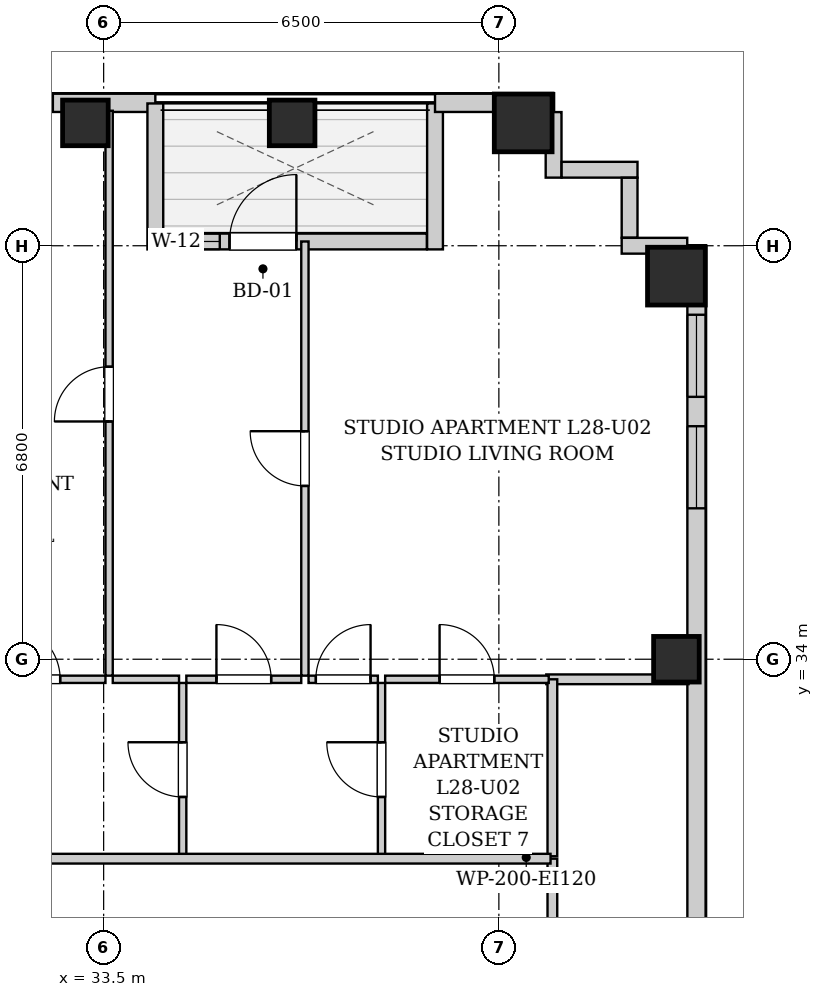
"""IFC4 building model, lengths in metres.
Left out: names, types, materials, properties, quantities, classifications, styles, units other than length and angle.
Written with IfcOpenShell. Run it as: python <this file> out.ifc"""

import sys

from ifc_helpers import new_model, si_unit, direction, frame, frame_2d, origin, origin_2d, place, context, subcontext, project, spatial, rectangle, extrude, element, fill, save


model = new_model("IFC4")
c1 = context("Model", 3, precision=1e-05, world=origin(), true_north=direction((0.0, 1.0)))
c2 = subcontext(c1, "Body", "Model", "MODEL_VIEW")
j1 = project(units=[si_unit("LENGTHUNIT", "METRE"), si_unit("PLANEANGLEUNIT", "RADIAN")], contexts=[c1])
p1 = place(None, origin())
s1 = spatial("IfcSite", under=j1, at=p1, CompositionType="ELEMENT")
p2 = place(p1, origin())
s2 = spatial("IfcBuilding", under=s1, at=p2, CompositionType="ELEMENT")
p3 = place(p2, frame((0.0, 0.0, 100.7)))
s3 = spatial("IfcBuildingStorey", under=s2, at=p3, CompositionType="ELEMENT", Elevation=100.7)
for number, where, z_axis, x_axis in (
    (1, (33.2, 42.82, 0.0), (0.0, 0.0, 1.0), (1.0, 0.0, 0.0)),
    (2, (36.6, 42.82, 0.0), (0.0, 0.0, 1.0), (1.0, 0.0, 0.0)),
):
    element("IfcColumn", number, at=place(p3, frame(where, z_axis=z_axis, x_axis=x_axis)), inside=s3, PredefinedType="COLUMN", context=c2, shape_type="SweptSolid", body=[
        extrude(rectangle(XDim=0.75, YDim=0.75, at=origin_2d()), origin(), (0.0, 0.0, 1.0), 3.2),
    ])
p4 = place(p3, frame((40.4, 42.82, 0.0), z_axis=(0.0, 0.0, 1.0), x_axis=(1.0, 0.0, 0.0)))
e3 = element("IfcColumn", 3, at=p4, inside=s3, PredefinedType="COLUMN", context=c2, shape_type="SweptSolid", body=[
    extrude(rectangle(XDim=0.95, YDim=0.95, at=origin_2d()), origin(), (0.0, 0.0, 1.0), 3.2),
])
p5 = place(p3, frame((42.92, 34.0, 0.0), z_axis=(0.0, 0.0, 1.0), x_axis=(1.0, 0.0, 0.0)))
e4 = element("IfcColumn", 4, at=p5, inside=s3, PredefinedType="COLUMN", context=c2, shape_type="SweptSolid", body=[
    extrude(rectangle(XDim=0.75, YDim=0.75, at=origin_2d()), origin(), (0.0, 0.0, 1.0), 3.2),
])
p6 = place(p3, frame((42.92, 40.3, 0.0), z_axis=(0.0, 0.0, 1.0), x_axis=(1.0, 0.0, 0.0)))
e5 = element("IfcColumn", 5, at=p6, inside=s3, PredefinedType="COLUMN", context=c2, shape_type="SweptSolid", body=[
    extrude(rectangle(XDim=0.95, YDim=0.95, at=origin_2d()), origin(), (0.0, 0.0, 1.0), 3.2),
])
p7 = place(p3, frame((10.0, 43.15, 0.0), z_axis=(0.0, 0.0, 1.0), x_axis=(1.0, 0.0, 0.0)))
e6 = element("IfcWall", 6, at=p7, inside=s3, PredefinedType="SOLIDWALL", context=c2, shape_type="SweptSolid", body=[
    extrude(rectangle(XDim=24.35, YDim=0.3, at=frame_2d((12.175, 0.0))), origin(), (0.0, 0.0, 1.0), 2.94),
])
p8 = place(p7, frame((1.956, 0.0, 0.55)))
e7 = element("IfcOpeningElement", 7, at=p8, cuts=e6, PredefinedType="OPENING", context=c2, shape_type="SweptSolid", body=[
    extrude(rectangle(XDim=1.35, YDim=1.2, at=frame_2d((0.675, 0.6))), frame((0.0, 0.16, 0.0), z_axis=(0.0, -1.0, 0.0), x_axis=(1.0, 0.0, 0.0)), (0.0, 0.0, 1.0), 0.32),
])
p9 = place(p7, frame((5.187, 0.0, 0.55)))
e8 = element("IfcOpeningElement", 8, at=p9, cuts=e6, PredefinedType="OPENING", context=c2, shape_type="SweptSolid", body=[
    extrude(rectangle(XDim=1.35, YDim=1.2, at=frame_2d((0.675, 0.6))), frame((0.0, 0.16, 0.0), z_axis=(0.0, -1.0, 0.0), x_axis=(1.0, 0.0, 0.0)), (0.0, 0.0, 1.0), 0.32),
])
p10 = place(p7, frame((8.418, 0.0, 0.55)))
e9 = element("IfcOpeningElement", 9, at=p10, cuts=e6, PredefinedType="OPENING", context=c2, shape_type="SweptSolid", body=[
    extrude(rectangle(XDim=1.35, YDim=1.2, at=frame_2d((0.675, 0.6))), frame((0.0, 0.16, 0.0), z_axis=(0.0, -1.0, 0.0), x_axis=(1.0, 0.0, 0.0)), (0.0, 0.0, 1.0), 0.32),
])
p11 = place(p7, frame((11.15, 0.0, 0.55)))
e10 = element("IfcOpeningElement", 10, at=p11, cuts=e6, PredefinedType="OPENING", context=c2, shape_type="SweptSolid", body=[
    extrude(rectangle(XDim=1.35, YDim=1.2, at=frame_2d((0.675, 0.6))), frame((0.0, 0.16, 0.0), z_axis=(0.0, -1.0, 0.0), x_axis=(1.0, 0.0, 0.0)), (0.0, 0.0, 1.0), 0.32),
])
p12 = place(p7, frame((18.038, 0.0, 0.55)))
e11 = element("IfcOpeningElement", 11, at=p12, cuts=e6, PredefinedType="OPENING", context=c2, shape_type="SweptSolid", body=[
    extrude(rectangle(XDim=1.35, YDim=1.2, at=frame_2d((0.675, 0.6))), frame((0.0, 0.16, 0.0), z_axis=(0.0, -1.0, 0.0), x_axis=(1.0, 0.0, 0.0)), (0.0, 0.0, 1.0), 0.32),
])
p13 = place(p7, frame((21.315, 0.0, 0.55)))
e12 = element("IfcOpeningElement", 12, at=p13, cuts=e6, PredefinedType="OPENING", context=c2, shape_type="SweptSolid", body=[
    extrude(rectangle(XDim=1.35, YDim=1.2, at=frame_2d((0.675, 0.6))), frame((0.0, 0.16, 0.0), z_axis=(0.0, -1.0, 0.0), x_axis=(1.0, 0.0, 0.0)), (0.0, 0.0, 1.0), 0.32),
])
p14 = place(p3, frame((34.35, 43.14, 0.0), z_axis=(0.0, 0.0, 1.0), x_axis=(0.0, -1.0, 0.0)))
e13 = element("IfcWall", 13, at=p14, inside=s3, PredefinedType="SOLIDWALL", context=c2, shape_type="SweptSolid", body=[
    extrude(rectangle(XDim=2.4, YDim=0.26, at=frame_2d((1.2, 0.0))), origin(), (0.0, 0.0, 1.0), 2.94),
])
p15 = place(p3, frame((34.484, 40.87, 0.0), z_axis=(0.0, 0.0, 1.0), x_axis=(1.0, 0.0, 0.0)))
e14 = element("IfcWall", 14, at=p15, inside=s3, PredefinedType="SOLIDWALL", context=c2, shape_type="SweptSolid", body=[
    extrude(rectangle(XDim=4.332, YDim=0.26, at=frame_2d((2.166, 0.0))), origin(), (0.0, 0.0, 1.0), 2.94),
])
p16 = place(p15, frame((1.086, 0.0, 0.0)))
e15 = element("IfcOpeningElement", 15, at=p16, cuts=e14, PredefinedType="OPENING", context=c2, shape_type="SweptSolid", body=[
    extrude(rectangle(XDim=1.1, YDim=2.0, at=frame_2d((0.55, 1.0))), frame((0.0, 0.14, 0.0), z_axis=(0.0, -1.0, 0.0), x_axis=(1.0, 0.0, 0.0)), (0.0, 0.0, 1.0), 0.28),
])
p17 = place(p15, frame((0.246, 0.0, 0.55)))
e16 = element("IfcOpeningElement", 16, at=p17, cuts=e14, PredefinedType="OPENING", context=c2, shape_type="SweptSolid", body=[
    extrude(rectangle(XDim=0.68, YDim=1.2, at=frame_2d((0.34, 0.6))), frame((0.0, 0.14, 0.0), z_axis=(0.0, -1.0, 0.0), x_axis=(1.0, 0.0, 0.0)), (0.0, 0.0, 1.0), 0.28),
])
p18 = place(p3, frame((38.95, 40.74, 0.0), z_axis=(0.0, 0.0, 1.0), x_axis=(0.0, 1.0, 0.0)))
e17 = element("IfcWall", 17, at=p18, inside=s3, PredefinedType="SOLIDWALL", context=c2, shape_type="SweptSolid", body=[
    extrude(rectangle(XDim=2.4, YDim=0.26, at=frame_2d((1.2, 0.0))), origin(), (0.0, 0.0, 1.0), 2.94),
])
p19 = place(p3, frame((38.95, 43.15, 0.0), z_axis=(0.0, 0.0, 1.0), x_axis=(1.0, 0.0, 0.0)))
e18 = element("IfcWall", 18, at=p19, inside=s3, PredefinedType="SOLIDWALL", context=c2, shape_type="SweptSolid", body=[
    extrude(rectangle(XDim=1.95, YDim=0.3, at=frame_2d((0.975, 0.0))), origin(), (0.0, 0.0, 1.0), 2.94),
])
p20 = place(p3, frame((43.25, 40.8, 0.0), z_axis=(0.0, 0.0, 1.0), x_axis=(0.0, -1.0, 0.0)))
e19 = element("IfcWall", 19, at=p20, inside=s3, PredefinedType="SOLIDWALL", context=c2, shape_type="SweptSolid", body=[
    extrude(rectangle(XDim=12.6, YDim=0.3, at=frame_2d((6.3, 0.0))), origin(), (0.0, 0.0, 1.0), 2.94),
])
p21 = place(p20, frame((2.968, 0.0, 0.55)))
e20 = element("IfcOpeningElement", 20, at=p21, cuts=e19, PredefinedType="OPENING", context=c2, shape_type="SweptSolid", body=[
    extrude(rectangle(XDim=1.35, YDim=1.2, at=frame_2d((0.675, 0.6))), frame((0.0, 0.16, 0.0), z_axis=(0.0, -1.0, 0.0), x_axis=(1.0, 0.0, 0.0)), (0.0, 0.0, 1.0), 0.32),
])
p22 = place(p20, frame((1.135, 0.0, 0.55)))
e21 = element("IfcOpeningElement", 21, at=p22, cuts=e19, PredefinedType="OPENING", context=c2, shape_type="SweptSolid", body=[
    extrude(rectangle(XDim=1.35, YDim=1.2, at=frame_2d((0.675, 0.6))), frame((0.0, 0.16, 0.0), z_axis=(0.0, -1.0, 0.0), x_axis=(1.0, 0.0, 0.0)), (0.0, 0.0, 1.0), 0.32),
])
p23 = place(p3, frame((40.9, 42.998, 0.0), z_axis=(0.0, 0.0, 1.0), x_axis=(0.0, -1.0, 0.0)))
e22 = element("IfcWall", 22, at=p23, inside=s3, PredefinedType="SOLIDWALL", context=c2, shape_type="SweptSolid", body=[
    extrude(rectangle(XDim=1.078, YDim=0.26, at=frame_2d((0.539, 0.0))), origin(), (0.0, 0.0, 1.0), 2.94),
])
p24 = place(p3, frame((41.032, 42.05, 0.0), z_axis=(0.0, 0.0, 1.0), x_axis=(1.0, 0.0, 0.0)))
e23 = element("IfcWall", 23, at=p24, inside=s3, PredefinedType="SOLIDWALL", context=c2, shape_type="SweptSolid", body=[
    extrude(rectangle(XDim=1.248, YDim=0.26, at=frame_2d((0.624, 0.0))), origin(), (0.0, 0.0, 1.0), 2.94),
])
p25 = place(p3, frame((42.15, 41.918, 0.0), z_axis=(0.0, 0.0, 1.0), x_axis=(0.0, -1.0, 0.0)))
e24 = element("IfcWall", 24, at=p25, inside=s3, PredefinedType="SOLIDWALL", context=c2, shape_type="SweptSolid", body=[
    extrude(rectangle(XDim=0.986, YDim=0.26, at=frame_2d((0.493, 0.0))), origin(), (0.0, 0.0, 1.0), 2.94),
])
p26 = place(p3, frame((42.02, 40.8, 0.0), z_axis=(0.0, 0.0, 1.0), x_axis=(1.0, 0.0, 0.0)))
e25 = element("IfcWall", 25, at=p26, inside=s3, PredefinedType="SOLIDWALL", context=c2, shape_type="SweptSolid", body=[
    extrude(rectangle(XDim=1.078, YDim=0.26, at=frame_2d((0.539, 0.0))), origin(), (0.0, 0.0, 1.0), 2.94),
])
p27 = place(p3, frame((40.88, 28.98, 0.0), z_axis=(0.0, 0.0, 1.0), x_axis=(0.0, 1.0, 0.0)))
e26 = element("IfcWall", 26, at=p27, inside=s3, PredefinedType="PARTITIONING", context=c2, shape_type="SweptSolid", body=[
    extrude(rectangle(XDim=1.74, YDim=0.16, at=frame_2d((0.87, 0.0))), origin(), (0.0, 0.0, 1.0), 2.94),
])
p28 = place(p3, frame((40.78, 33.67, 0.0), z_axis=(0.0, 0.0, 1.0), x_axis=(1.0, 0.0, 0.0)))
e27 = element("IfcWall", 27, at=p28, inside=s3, PredefinedType="PARTITIONING", context=c2, shape_type="SweptSolid", body=[
    extrude(rectangle(XDim=2.34, YDim=0.16, at=frame_2d((1.17, 0.0))), origin(), (0.0, 0.0, 1.0), 2.94),
])
p29 = place(p3, frame((40.88, 30.76, 0.0), z_axis=(0.0, 0.0, 1.0), x_axis=(0.0, 1.0, 0.0)))
e28 = element("IfcWall", 28, at=p29, inside=s3, PredefinedType="PARTITIONING", context=c2, shape_type="SweptSolid", body=[
    extrude(rectangle(XDim=2.91, YDim=0.16, at=frame_2d((1.455, 0.0))), origin(), (0.0, 0.0, 1.0), 2.94),
])
p30 = place(p3, frame((34.8, 30.76, 0.0), z_axis=(0.0, 0.0, 1.0), x_axis=(0.0, 1.0, 0.0)))
e29 = element("IfcWall", 29, at=p30, inside=s3, PredefinedType="PARTITIONING", context=c2, shape_type="SweptSolid", body=[
    extrude(rectangle(XDim=2.85, YDim=0.12, at=frame_2d((1.425, 0.0))), origin(), (0.0, 0.0, 1.0), 2.94),
])
p31 = place(p30, frame((0.975, 0.0, 0.0)))
e30 = element("IfcOpeningElement", 30, at=p31, cuts=e29, PredefinedType="OPENING", context=c2, shape_type="SweptSolid", body=[
    extrude(rectangle(XDim=0.9, YDim=2.05, at=frame_2d((0.45, 1.025))), frame((0.0, 0.07, 0.0), z_axis=(0.0, -1.0, 0.0), x_axis=(1.0, 0.0, 0.0)), (0.0, 0.0, 1.0), 0.14),
])
p32 = place(p3, frame((31.14, 33.67, 0.0), z_axis=(0.0, 0.0, 1.0), x_axis=(1.0, 0.0, 0.0)))
e31 = element("IfcWall", 31, at=p32, inside=s3, PredefinedType="PARTITIONING", context=c2, shape_type="SweptSolid", body=[
    extrude(rectangle(XDim=2.39, YDim=0.12, at=frame_2d((1.195, 0.0))), origin(), (0.0, 0.0, 1.0), 2.94),
])
p33 = place(p32, frame((0.745, 0.0, 0.0)))
e32 = element("IfcOpeningElement", 32, at=p33, cuts=e31, PredefinedType="OPENING", context=c2, shape_type="SweptSolid", body=[
    extrude(rectangle(XDim=0.9, YDim=2.05, at=frame_2d((0.45, 1.025))), frame((0.0, 0.07, 0.0), z_axis=(0.0, -1.0, 0.0), x_axis=(1.0, 0.0, 0.0)), (0.0, 0.0, 1.0), 0.14),
])
p34 = place(p3, frame((33.65, 33.67, 0.0), z_axis=(0.0, 0.0, 1.0), x_axis=(1.0, 0.0, 0.0)))
e33 = element("IfcWall", 33, at=p34, inside=s3, PredefinedType="PARTITIONING", context=c2, shape_type="SweptSolid", body=[
    extrude(rectangle(XDim=1.09, YDim=0.12, at=frame_2d((0.545, 0.0))), origin(), (0.0, 0.0, 1.0), 2.94),
])
p35 = place(p3, frame((38.07, 30.76, 0.0), z_axis=(0.0, 0.0, 1.0), x_axis=(0.0, 1.0, 0.0)))
e34 = element("IfcWall", 34, at=p35, inside=s3, PredefinedType="PARTITIONING", context=c2, shape_type="SweptSolid", body=[
    extrude(rectangle(XDim=2.85, YDim=0.12, at=frame_2d((1.425, 0.0))), origin(), (0.0, 0.0, 1.0), 2.94),
])
p36 = place(p35, frame((0.975, 0.0, 0.0)))
e35 = element("IfcOpeningElement", 35, at=p36, cuts=e34, PredefinedType="OPENING", context=c2, shape_type="SweptSolid", body=[
    extrude(rectangle(XDim=0.9, YDim=2.05, at=frame_2d((0.45, 1.025))), frame((0.0, 0.07, 0.0), z_axis=(0.0, -1.0, 0.0), x_axis=(1.0, 0.0, 0.0)), (0.0, 0.0, 1.0), 0.14),
])
p37 = place(p3, frame((34.86, 33.67, 0.0), z_axis=(0.0, 0.0, 1.0), x_axis=(1.0, 0.0, 0.0)))
e36 = element("IfcWall", 36, at=p37, inside=s3, PredefinedType="PARTITIONING", context=c2, shape_type="SweptSolid", body=[
    extrude(rectangle(XDim=1.89, YDim=0.12, at=frame_2d((0.945, 0.0))), origin(), (0.0, 0.0, 1.0), 2.94),
])
p38 = place(p37, frame((0.495, 0.0, 0.0)))
e37 = element("IfcOpeningElement", 37, at=p38, cuts=e36, PredefinedType="OPENING", context=c2, shape_type="SweptSolid", body=[
    extrude(rectangle(XDim=0.9, YDim=2.05, at=frame_2d((0.45, 1.025))), frame((0.0, 0.07, 0.0), z_axis=(0.0, -1.0, 0.0), x_axis=(1.0, 0.0, 0.0)), (0.0, 0.0, 1.0), 0.14),
])
p39 = place(p3, frame((36.87, 33.67, 0.0), z_axis=(0.0, 0.0, 1.0), x_axis=(1.0, 0.0, 0.0)))
e38 = element("IfcWall", 38, at=p39, inside=s3, PredefinedType="PARTITIONING", context=c2, shape_type="SweptSolid", body=[
    extrude(rectangle(XDim=1.14, YDim=0.12, at=frame_2d((0.57, 0.0))), origin(), (0.0, 0.0, 1.0), 2.94),
])
p40 = place(p39, frame((0.12, 0.0, 0.0)))
e39 = element("IfcOpeningElement", 39, at=p40, cuts=e38, PredefinedType="OPENING", context=c2, shape_type="SweptSolid", body=[
    extrude(rectangle(XDim=0.9, YDim=2.05, at=frame_2d((0.45, 1.025))), frame((0.0, 0.07, 0.0), z_axis=(0.0, -1.0, 0.0), x_axis=(1.0, 0.0, 0.0)), (0.0, 0.0, 1.0), 0.14),
])
p41 = place(p3, frame((38.13, 33.67, 0.0), z_axis=(0.0, 0.0, 1.0), x_axis=(1.0, 0.0, 0.0)))
e40 = element("IfcWall", 40, at=p41, inside=s3, PredefinedType="PARTITIONING", context=c2, shape_type="SweptSolid", body=[
    extrude(rectangle(XDim=2.69, YDim=0.12, at=frame_2d((1.345, 0.0))), origin(), (0.0, 0.0, 1.0), 2.94),
])
p42 = place(p41, frame((0.895, 0.0, 0.0)))
e41 = element("IfcOpeningElement", 41, at=p42, cuts=e40, PredefinedType="OPENING", context=c2, shape_type="SweptSolid", body=[
    extrude(rectangle(XDim=0.9, YDim=2.05, at=frame_2d((0.45, 1.025))), frame((0.0, 0.07, 0.0), z_axis=(0.0, -1.0, 0.0), x_axis=(1.0, 0.0, 0.0)), (0.0, 0.0, 1.0), 0.14),
])
p43 = place(p3, frame((33.59, 33.73, 0.0), z_axis=(0.0, 0.0, 1.0), x_axis=(0.0, 1.0, 0.0)))
e42 = element("IfcWall", 42, at=p43, inside=s3, PredefinedType="PARTITIONING", context=c2, shape_type="SweptSolid", body=[
    extrude(rectangle(XDim=9.29, YDim=0.12, at=frame_2d((4.645, 0.0))), origin(), (0.0, 0.0, 1.0), 2.94),
])
p44 = place(p43, frame((4.18, 0.0, 0.0)))
e43 = element("IfcOpeningElement", 43, at=p44, cuts=e42, PredefinedType="OPENING", context=c2, shape_type="SweptSolid", body=[
    extrude(rectangle(XDim=0.9, YDim=2.05, at=frame_2d((0.45, 1.025))), frame((0.0, 0.07, 0.0), z_axis=(0.0, -1.0, 0.0), x_axis=(1.0, 0.0, 0.0)), (0.0, 0.0, 1.0), 0.14),
])
p45 = place(p3, frame((36.81, 33.73, 0.0), z_axis=(0.0, 0.0, 1.0), x_axis=(0.0, 1.0, 0.0)))
e44 = element("IfcWall", 44, at=p45, inside=s3, PredefinedType="PARTITIONING", context=c2, shape_type="SweptSolid", body=[
    extrude(rectangle(XDim=7.14, YDim=0.12, at=frame_2d((3.57, 0.0))), origin(), (0.0, 0.0, 1.0), 2.94),
])
p46 = place(p45, frame((3.12, 0.0, 0.0)))
e45 = element("IfcOpeningElement", 45, at=p46, cuts=e44, PredefinedType="OPENING", context=c2, shape_type="SweptSolid", body=[
    extrude(rectangle(XDim=0.9, YDim=2.05, at=frame_2d((0.45, 1.025))), frame((0.0, 0.07, 0.0), z_axis=(0.0, -1.0, 0.0), x_axis=(1.0, 0.0, 0.0)), (0.0, 0.0, 1.0), 0.14),
])
p47 = place(p3, frame((10.05, 30.72, 0.0), z_axis=(0.0, 0.0, 1.0), x_axis=(1.0, 0.0, 0.0)))
e46 = element("IfcWall", 46, at=p47, inside=s3, PredefinedType="PARTITIONING", context=c2, shape_type="SweptSolid", body=[
    extrude(rectangle(XDim=30.8, YDim=0.16, at=frame_2d((15.4, 0.0))), origin(), (0.0, 0.0, 1.0), 2.94),
])
p48 = place(p47, frame((4.295, 0.0, 0.0)))
e47 = element("IfcOpeningElement", 47, at=p48, cuts=e46, PredefinedType="OPENING", context=c2, shape_type="SweptSolid", body=[
    extrude(rectangle(XDim=0.95, YDim=2.1, at=frame_2d((0.475, 1.05))), frame((0.0, 0.09, 0.0), z_axis=(0.0, -1.0, 0.0), x_axis=(1.0, 0.0, 0.0)), (0.0, 0.0, 1.0), 0.18),
])
p49 = place(p31, origin())
e48 = element("IfcDoor", 48, at=p49, inside=s3, OperationType="SINGLE_SWING_RIGHT", PredefinedType="DOOR", context=c2, shape_type="SweptSolid", body=[
    extrude(rectangle(XDim=0.9, YDim=2.05, at=frame_2d((0.45, 1.025))), frame((0.0, 0.025, 0.0), z_axis=(0.0, -1.0, 0.0), x_axis=(1.0, 0.0, 0.0)), (0.0, 0.0, 1.0), 0.05),
])
fill(e30, e48)
p50 = place(p33, origin())
e49 = element("IfcDoor", 49, at=p50, inside=s3, OperationType="SINGLE_SWING_LEFT", PredefinedType="DOOR", context=c2, shape_type="SweptSolid", body=[
    extrude(rectangle(XDim=0.9, YDim=2.05, at=frame_2d((0.45, 1.025))), frame((0.0, 0.025, 0.0), z_axis=(0.0, -1.0, 0.0), x_axis=(1.0, 0.0, 0.0)), (0.0, 0.0, 1.0), 0.05),
])
fill(e32, e49)
p51 = place(p36, origin())
e50 = element("IfcDoor", 50, at=p51, inside=s3, OperationType="SINGLE_SWING_RIGHT", PredefinedType="DOOR", context=c2, shape_type="SweptSolid", body=[
    extrude(rectangle(XDim=0.9, YDim=2.05, at=frame_2d((0.45, 1.025))), frame((0.0, 0.025, 0.0), z_axis=(0.0, -1.0, 0.0), x_axis=(1.0, 0.0, 0.0)), (0.0, 0.0, 1.0), 0.05),
])
fill(e35, e50)
p52 = place(p38, origin())
e51 = element("IfcDoor", 51, at=p52, inside=s3, OperationType="SINGLE_SWING_LEFT", PredefinedType="DOOR", context=c2, shape_type="SweptSolid", body=[
    extrude(rectangle(XDim=0.9, YDim=2.05, at=frame_2d((0.45, 1.025))), frame((0.0, 0.025, 0.0), z_axis=(0.0, -1.0, 0.0), x_axis=(1.0, 0.0, 0.0)), (0.0, 0.0, 1.0), 0.05),
])
fill(e37, e51)
p53 = place(p40, origin())
e52 = element("IfcDoor", 52, at=p53, inside=s3, OperationType="SINGLE_SWING_RIGHT", PredefinedType="DOOR", context=c2, shape_type="SweptSolid", body=[
    extrude(rectangle(XDim=0.9, YDim=2.05, at=frame_2d((0.45, 1.025))), frame((0.0, 0.025, 0.0), z_axis=(0.0, -1.0, 0.0), x_axis=(1.0, 0.0, 0.0)), (0.0, 0.0, 1.0), 0.05),
])
fill(e39, e52)
p54 = place(p42, origin())
e53 = element("IfcDoor", 53, at=p54, inside=s3, OperationType="SINGLE_SWING_LEFT", PredefinedType="DOOR", context=c2, shape_type="SweptSolid", body=[
    extrude(rectangle(XDim=0.9, YDim=2.05, at=frame_2d((0.45, 1.025))), frame((0.0, 0.025, 0.0), z_axis=(0.0, -1.0, 0.0), x_axis=(1.0, 0.0, 0.0)), (0.0, 0.0, 1.0), 0.05),
])
fill(e41, e53)
p55 = place(p44, origin())
e54 = element("IfcDoor", 54, at=p55, inside=s3, OperationType="SINGLE_SWING_LEFT", PredefinedType="DOOR", context=c2, shape_type="SweptSolid", body=[
    extrude(rectangle(XDim=0.9, YDim=2.05, at=frame_2d((0.45, 1.025))), frame((0.0, 0.025, 0.0), z_axis=(0.0, -1.0, 0.0), x_axis=(1.0, 0.0, 0.0)), (0.0, 0.0, 1.0), 0.05),
])
fill(e43, e54)
p56 = place(p46, origin())
e55 = element("IfcDoor", 55, at=p56, inside=s3, OperationType="SINGLE_SWING_RIGHT", PredefinedType="DOOR", context=c2, shape_type="SweptSolid", body=[
    extrude(rectangle(XDim=0.9, YDim=2.05, at=frame_2d((0.45, 1.025))), frame((0.0, 0.025, 0.0), z_axis=(0.0, -1.0, 0.0), x_axis=(1.0, 0.0, 0.0)), (0.0, 0.0, 1.0), 0.05),
])
fill(e45, e55)
p57 = place(p16, origin())
e56 = element("IfcDoor", 56, at=p57, inside=s3, OperationType="SINGLE_SWING_RIGHT", PredefinedType="DOOR", context=c2, shape_type="SweptSolid", body=[
    extrude(rectangle(XDim=1.1, YDim=2.0, at=frame_2d((0.55, 1.0))), frame((0.0, 0.025, 0.0), z_axis=(0.0, -1.0, 0.0), x_axis=(1.0, 0.0, 0.0)), (0.0, 0.0, 1.0), 0.05),
])
fill(e15, e56)
p58 = place(p13, origin())
e57 = element("IfcWindow", 57, at=p58, inside=s3, PartitioningType="SINGLE_PANEL", PredefinedType="WINDOW", context=c2, shape_type="SweptSolid", body=[
    extrude(rectangle(XDim=1.35, YDim=1.2, at=frame_2d((0.675, 0.6))), frame((0.0, 0.03, 0.0), z_axis=(0.0, -1.0, 0.0), x_axis=(1.0, 0.0, 0.0)), (0.0, 0.0, 1.0), 0.06),
])
fill(e12, e57)
p59 = place(p17, origin())
e58 = element("IfcWindow", 58, at=p59, inside=s3, PartitioningType="SINGLE_PANEL", PredefinedType="WINDOW", context=c2, shape_type="SweptSolid", body=[
    extrude(rectangle(XDim=0.68, YDim=1.2, at=frame_2d((0.34, 0.6))), frame((0.0, 0.03, 0.0), z_axis=(0.0, -1.0, 0.0), x_axis=(1.0, 0.0, 0.0)), (0.0, 0.0, 1.0), 0.06),
])
fill(e16, e58)
p60 = place(p21, origin())
e59 = element("IfcWindow", 59, at=p60, inside=s3, PartitioningType="SINGLE_PANEL", PredefinedType="WINDOW", context=c2, shape_type="SweptSolid", body=[
    extrude(rectangle(XDim=1.35, YDim=1.2, at=frame_2d((0.675, 0.6))), frame((0.0, 0.03, 0.0), z_axis=(0.0, -1.0, 0.0), x_axis=(1.0, 0.0, 0.0)), (0.0, 0.0, 1.0), 0.06),
])
fill(e20, e59)
p61 = place(p22, origin())
e60 = element("IfcWindow", 60, at=p61, inside=s3, PartitioningType="SINGLE_PANEL", PredefinedType="WINDOW", context=c2, shape_type="SweptSolid", body=[
    extrude(rectangle(XDim=1.35, YDim=1.2, at=frame_2d((0.675, 0.6))), frame((0.0, 0.03, 0.0), z_axis=(0.0, -1.0, 0.0), x_axis=(1.0, 0.0, 0.0)), (0.0, 0.0, 1.0), 0.06),
])
fill(e21, e60)
save(model, sys.argv[1])
